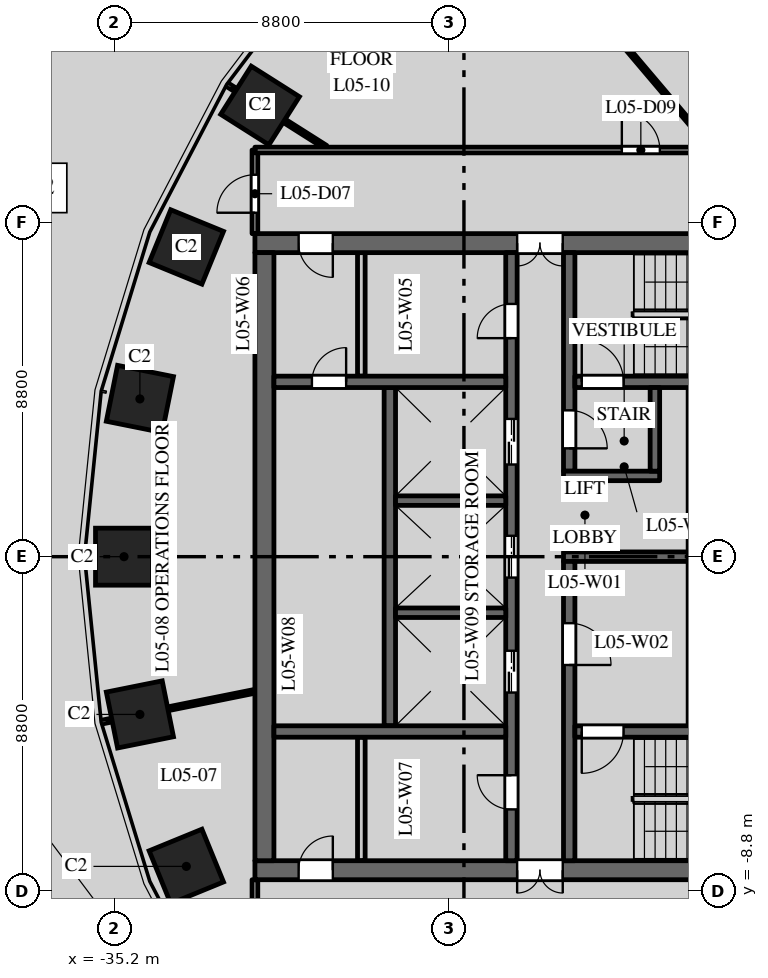
"""IFC4 building model, lengths in metres.
Left out: names, types, materials, properties, quantities, classifications, styles, units other than length and angle.
Written with IfcOpenShell. Run it as: python <this file> out.ifc"""

import sys

from ifc_helpers import new_model, si_unit, direction, frame, frame_2d, origin, origin_2d, place, context, subcontext, project, spatial, rectangle, extrude, element, fill, save


model = new_model("IFC4")
c1 = context("Model", 3, precision=1e-05, world=origin(), true_north=direction((0.0, 1.0)))
c2 = subcontext(c1, "Body", "Model", "MODEL_VIEW")
j1 = project(units=[si_unit("LENGTHUNIT", "METRE"), si_unit("PLANEANGLEUNIT", "RADIAN")], contexts=[c1])
p1 = place(None, origin())
s1 = spatial("IfcSite", under=j1, at=p1, CompositionType="ELEMENT")
p2 = place(p1, origin())
s2 = spatial("IfcBuilding", under=s1, at=p2, CompositionType="ELEMENT")
p3 = place(p2, frame((0.0, 0.0, 30.5)))
s3 = spatial("IfcBuildingStorey", under=s2, at=p3, CompositionType="ELEMENT", Elevation=30.5)
for number, where, z_axis, x_axis in (
    (1, (-31.365, 11.871, 0.0), (0.0, 0.0, 1.0), (-0.535, -0.845, 0.0)),
    (2, (-33.305, 8.149, 0.0), (0.0, 0.0, 1.0), (-0.379, -0.925, 0.0)),
    (3, (-34.527, 4.151, 0.0), (0.0, 0.0, 1.0), (-0.197, -0.98, 0.0)),
    (4, (-34.945, 0.0, 0.0), (0.0, 0.0, 1.0), (0.0, -1.0, 0.0)),
    (5, (-34.527, -4.151, 0.0), (0.0, 0.0, 1.0), (0.197, -0.98, 0.0)),
    (6, (-33.305, -8.149, 0.0), (0.0, 0.0, 1.0), (0.379, -0.925, 0.0)),
):
    element("IfcColumn", number, at=place(p3, frame(where, z_axis=z_axis, x_axis=x_axis)), inside=s3, PredefinedType="COLUMN", context=c2, shape_type="SweptSolid", body=[
        extrude(rectangle(XDim=1.5, YDim=1.5, at=origin_2d()), origin(), (0.0, 0.0, 1.0), 4.0),
    ])
p4 = place(p3, frame((-16.5, 8.25, 0.0), z_axis=(0.0, 0.0, 1.0), x_axis=(-1.0, 0.0, 0.0)))
e7 = element("IfcWall", 7, at=p4, inside=s3, PredefinedType="SHEAR", context=c2, shape_type="SweptSolid", body=[
    extrude(rectangle(XDim=15.0, YDim=0.5, at=frame_2d((7.5, 0.0))), origin(), (0.0, 0.0, 1.0), 3.7),
])
p5 = place(p4, frame((6.9, 0.0, 0.0)))
e8 = element("IfcOpeningElement", 8, at=p5, cuts=e7, PredefinedType="OPENING", context=c2, shape_type="SweptSolid", body=[
    extrude(rectangle(XDim=1.2, YDim=2.1, at=frame_2d((0.6, 1.05))), frame((0.0, 0.26, 0.0), z_axis=(0.0, -1.0, 0.0), x_axis=(1.0, 0.0, 0.0)), (0.0, 0.0, 1.0), 0.52),
])
p6 = place(p4, frame((12.95, 0.0, 0.0)))
e9 = element("IfcOpeningElement", 9, at=p6, cuts=e7, PredefinedType="OPENING", context=c2, shape_type="SweptSolid", body=[
    extrude(rectangle(XDim=0.9, YDim=2.1, at=frame_2d((0.45, 1.05))), frame((0.0, 0.26, 0.0), z_axis=(0.0, -1.0, 0.0), x_axis=(1.0, 0.0, 0.0)), (0.0, 0.0, 1.0), 0.52),
])
p7 = place(p3, frame((-16.5, -8.25, 0.0), z_axis=(0.0, 0.0, 1.0), x_axis=(-1.0, 0.0, 0.0)))
e10 = element("IfcWall", 10, at=p7, inside=s3, PredefinedType="SHEAR", context=c2, shape_type="SweptSolid", body=[
    extrude(rectangle(XDim=15.0, YDim=0.5, at=frame_2d((7.5, 0.0))), origin(), (0.0, 0.0, 1.0), 3.7),
])
p8 = place(p7, frame((6.9, 0.0, 0.0)))
e11 = element("IfcOpeningElement", 11, at=p8, cuts=e10, PredefinedType="OPENING", context=c2, shape_type="SweptSolid", body=[
    extrude(rectangle(XDim=1.2, YDim=2.1, at=frame_2d((0.6, 1.05))), frame((0.0, 0.26, 0.0), z_axis=(0.0, -1.0, 0.0), x_axis=(1.0, 0.0, 0.0)), (0.0, 0.0, 1.0), 0.52),
])
p9 = place(p7, frame((12.95, 0.0, 0.0)))
e12 = element("IfcOpeningElement", 12, at=p9, cuts=e10, PredefinedType="OPENING", context=c2, shape_type="SweptSolid", body=[
    extrude(rectangle(XDim=0.9, YDim=2.1, at=frame_2d((0.45, 1.05))), frame((0.0, 0.26, 0.0), z_axis=(0.0, -1.0, 0.0), x_axis=(1.0, 0.0, 0.0)), (0.0, 0.0, 1.0), 0.52),
])
p10 = place(p3, frame((-27.95, -4.45, 0.0), z_axis=(0.0, 0.0, 1.0), x_axis=(0.0, 1.0, 0.0)))
e13 = element("IfcWall", 13, at=p10, inside=s3, PredefinedType="SHEAR", context=c2, shape_type="SweptSolid", body=[
    extrude(rectangle(XDim=8.9, YDim=0.3, at=frame_2d((4.45, 0.0))), origin(), (0.0, 0.0, 1.0), 3.7),
])
p11 = place(p3, frame((-24.75, -8.0, 0.0), z_axis=(0.0, 0.0, 1.0), x_axis=(0.0, 1.0, 0.0)))
e14 = element("IfcWall", 14, at=p11, inside=s3, PredefinedType="SHEAR", context=c2, shape_type="SweptSolid", body=[
    extrude(rectangle(XDim=16.0, YDim=0.3, at=frame_2d((8.0, 0.0))), origin(), (0.0, 0.0, 1.0), 3.7),
])
p12 = place(p11, frame((4.425, 0.0, 0.0)))
e15 = element("IfcOpeningElement", 15, at=p12, cuts=e14, PredefinedType="OPENING", context=c2, shape_type="SweptSolid", body=[
    extrude(rectangle(XDim=1.1, YDim=2.1, at=frame_2d((0.55, 1.05))), frame((0.0, 0.16, 0.0), z_axis=(0.0, -1.0, 0.0), x_axis=(1.0, 0.0, 0.0)), (0.0, 0.0, 1.0), 0.32),
])
p13 = place(p11, frame((7.45, 0.0, 0.0)))
e16 = element("IfcOpeningElement", 16, at=p13, cuts=e14, PredefinedType="OPENING", context=c2, shape_type="SweptSolid", body=[
    extrude(rectangle(XDim=1.1, YDim=2.1, at=frame_2d((0.55, 1.05))), frame((0.0, 0.16, 0.0), z_axis=(0.0, -1.0, 0.0), x_axis=(1.0, 0.0, 0.0)), (0.0, 0.0, 1.0), 0.32),
])
p14 = place(p11, frame((10.425, 0.0, 0.0)))
e17 = element("IfcOpeningElement", 17, at=p14, cuts=e14, PredefinedType="OPENING", context=c2, shape_type="SweptSolid", body=[
    extrude(rectangle(XDim=1.2, YDim=2.1, at=frame_2d((0.6, 1.05))), frame((0.0, 0.16, 0.0), z_axis=(0.0, -1.0, 0.0), x_axis=(1.0, 0.0, 0.0)), (0.0, 0.0, 1.0), 0.32),
])
p15 = place(p11, frame((13.75, 0.0, 0.0)))
e18 = element("IfcOpeningElement", 18, at=p15, cuts=e14, PredefinedType="OPENING", context=c2, shape_type="SweptSolid", body=[
    extrude(rectangle(XDim=0.9, YDim=2.1, at=frame_2d((0.45, 1.05))), frame((0.0, 0.16, 0.0), z_axis=(0.0, -1.0, 0.0), x_axis=(1.0, 0.0, 0.0)), (0.0, 0.0, 1.0), 0.32),
])
p16 = place(p11, frame((1.35, 0.0, 0.0)))
e19 = element("IfcOpeningElement", 19, at=p16, cuts=e14, PredefinedType="OPENING", context=c2, shape_type="SweptSolid", body=[
    extrude(rectangle(XDim=0.9, YDim=2.1, at=frame_2d((0.45, 1.05))), frame((0.0, 0.16, 0.0), z_axis=(0.0, -1.0, 0.0), x_axis=(1.0, 0.0, 0.0)), (0.0, 0.0, 1.0), 0.32),
])
p17 = place(p3, frame((-20.1, 0.0, 0.0), z_axis=(0.0, 0.0, 1.0), x_axis=(-1.0, 0.0, 0.0)))
e20 = element("IfcWall", 20, at=p17, inside=s3, PredefinedType="SHEAR", context=c2, shape_type="SweptSolid", body=[
    extrude(rectangle(XDim=3.28, YDim=0.25, at=frame_2d((1.64, 0.0))), origin(), (0.0, 0.0, 1.0), 3.7),
])
p18 = place(p3, frame((-31.25, -8.0, 0.0), z_axis=(0.0, 0.0, 1.0), x_axis=(0.0, 1.0, 0.0)))
e21 = element("IfcWall", 21, at=p18, inside=s3, PredefinedType="SHEAR", context=c2, shape_type="SweptSolid", body=[
    extrude(rectangle(XDim=16.0, YDim=0.5, at=frame_2d((8.0, 0.0))), origin(), (0.0, 0.0, 1.0), 3.7),
])
p19 = place(p3, frame((-24.9, 4.6, 0.0), z_axis=(0.0, 0.0, 1.0), x_axis=(-1.0, 0.0, 0.0)))
e22 = element("IfcWall", 22, at=p19, inside=s3, PredefinedType="SHEAR", context=c2, shape_type="SweptSolid", body=[
    extrude(rectangle(XDim=6.1, YDim=0.3, at=frame_2d((3.05, 0.0))), origin(), (0.0, 0.0, 1.0), 3.7),
])
p20 = place(p19, frame((4.2, 0.0, 0.0)))
e23 = element("IfcOpeningElement", 23, at=p20, cuts=e22, PredefinedType="OPENING", context=c2, shape_type="SweptSolid", body=[
    extrude(rectangle(XDim=0.9, YDim=2.1, at=frame_2d((0.45, 1.05))), frame((0.0, 0.16, 0.0), z_axis=(0.0, -1.0, 0.0), x_axis=(1.0, 0.0, 0.0)), (0.0, 0.0, 1.0), 0.32),
])
for number, where, z_axis, x_axis in (
    (24, (-28.7, 4.75, 0.0), (0.0, 0.0, 1.0), (0.0, 1.0, 0.0)),
    (25, (-28.7, -8.0, 0.0), (0.0, 0.0, 1.0), (0.0, 1.0, 0.0)),
):
    element("IfcWall", number, at=place(p3, frame(where, z_axis=z_axis, x_axis=x_axis)), inside=s3, PredefinedType="PARTITIONING", context=c2, shape_type="SweptSolid", body=[
        extrude(rectangle(XDim=3.25, YDim=0.2, at=frame_2d((1.625, 0.0))), origin(), (0.0, 0.0, 1.0), 3.7),
    ])
p21 = place(p3, frame((-24.9, -4.6, 0.0), z_axis=(0.0, 0.0, 1.0), x_axis=(-1.0, 0.0, 0.0)))
e26 = element("IfcWall", 26, at=p21, inside=s3, PredefinedType="SHEAR", context=c2, shape_type="SweptSolid", body=[
    extrude(rectangle(XDim=6.1, YDim=0.3, at=frame_2d((3.05, 0.0))), origin(), (0.0, 0.0, 1.0), 3.7),
])
for number, where, z_axis, x_axis in (
    (27, (-24.9, -1.475, 0.0), (0.0, 0.0, 1.0), (-1.0, 0.0, 0.0)),
    (28, (-24.9, 1.475, 0.0), (0.0, 0.0, 1.0), (-1.0, 0.0, 0.0)),
):
    element("IfcWall", number, at=place(p3, frame(where, z_axis=z_axis, x_axis=x_axis)), inside=s3, PredefinedType="SHEAR", context=c2, shape_type="SweptSolid", body=[
        extrude(rectangle(XDim=2.9, YDim=0.25, at=frame_2d((1.45, 0.0))), origin(), (0.0, 0.0, 1.0), 3.7),
    ])
p22 = place(p3, frame((-23.23, 2.25, 0.0), z_axis=(0.0, 0.0, 1.0), x_axis=(0.0, 1.0, 0.0)))
e29 = element("IfcWall", 29, at=p22, inside=s3, PredefinedType="SHEAR", context=c2, shape_type="SweptSolid", body=[
    extrude(rectangle(XDim=5.75, YDim=0.3, at=frame_2d((2.875, 0.0))), origin(), (0.0, 0.0, 1.0), 3.7),
])
p23 = place(p22, frame((0.6, 0.0, 0.0)))
e30 = element("IfcOpeningElement", 30, at=p23, cuts=e29, PredefinedType="OPENING", context=c2, shape_type="SweptSolid", body=[
    extrude(rectangle(XDim=1.0, YDim=2.1, at=frame_2d((0.5, 1.05))), frame((0.0, 0.16, 0.0), z_axis=(0.0, -1.0, 0.0), x_axis=(1.0, 0.0, 0.0)), (0.0, 0.0, 1.0), 0.32),
])
p24 = place(p3, frame((-23.23, -8.0, 0.0), z_axis=(0.0, 0.0, 1.0), x_axis=(0.0, 1.0, 0.0)))
e31 = element("IfcWall", 31, at=p24, inside=s3, PredefinedType="SHEAR", context=c2, shape_type="SweptSolid", body=[
    extrude(rectangle(XDim=7.875, YDim=0.3, at=frame_2d((3.938, 0.0))), origin(), (0.0, 0.0, 1.0), 3.7),
])
p25 = place(p24, frame((5.15, 0.0, 0.0)))
e32 = element("IfcOpeningElement", 32, at=p25, cuts=e31, PredefinedType="OPENING", context=c2, shape_type="SweptSolid", body=[
    extrude(rectangle(XDim=1.1, YDim=2.1, at=frame_2d((0.55, 1.05))), frame((0.0, 0.16, 0.0), z_axis=(0.0, -1.0, 0.0), x_axis=(1.0, 0.0, 0.0)), (0.0, 0.0, 1.0), 0.32),
])
p26 = place(p3, frame((-16.9, 4.6, 0.0), z_axis=(0.0, 0.0, 1.0), x_axis=(-1.0, 0.0, 0.0)))
e33 = element("IfcWall", 33, at=p26, inside=s3, PredefinedType="SHEAR", context=c2, shape_type="SweptSolid", body=[
    extrude(rectangle(XDim=6.18, YDim=0.3, at=frame_2d((3.09, 0.0))), origin(), (0.0, 0.0, 1.0), 3.7),
])
p27 = place(p26, frame((4.9, 0.0, 0.0)))
e34 = element("IfcOpeningElement", 34, at=p27, cuts=e33, PredefinedType="OPENING", context=c2, shape_type="SweptSolid", body=[
    extrude(rectangle(XDim=1.1, YDim=2.1, at=frame_2d((0.55, 1.05))), frame((0.0, 0.16, 0.0), z_axis=(0.0, -1.0, 0.0), x_axis=(1.0, 0.0, 0.0)), (0.0, 0.0, 1.0), 0.32),
])
p28 = place(p3, frame((-16.9, -4.6, 0.0), z_axis=(0.0, 0.0, 1.0), x_axis=(-1.0, 0.0, 0.0)))
e35 = element("IfcWall", 35, at=p28, inside=s3, PredefinedType="SHEAR", context=c2, shape_type="SweptSolid", body=[
    extrude(rectangle(XDim=6.18, YDim=0.3, at=frame_2d((3.09, 0.0))), origin(), (0.0, 0.0, 1.0), 3.7),
])
p29 = place(p28, frame((4.9, 0.0, 0.0)))
e36 = element("IfcOpeningElement", 36, at=p29, cuts=e35, PredefinedType="OPENING", context=c2, shape_type="SweptSolid", body=[
    extrude(rectangle(XDim=1.1, YDim=2.1, at=frame_2d((0.55, 1.05))), frame((0.0, 0.16, 0.0), z_axis=(0.0, -1.0, 0.0), x_axis=(1.0, 0.0, 0.0)), (0.0, 0.0, 1.0), 0.32),
])
p30 = place(p3, frame((-20.85, 2.125, 0.0), z_axis=(0.0, 0.0, 1.0), x_axis=(-1.0, 0.0, 0.0)))
e37 = element("IfcWall", 37, at=p30, inside=s3, PredefinedType="SHEAR", context=c2, shape_type="SweptSolid", body=[
    extrude(rectangle(XDim=2.53, YDim=0.25, at=frame_2d((1.265, 0.0))), origin(), (0.0, 0.0, 1.0), 3.7),
])
p31 = place(p3, frame((-20.975, 2.25, 0.0), z_axis=(0.0, 0.0, 1.0), x_axis=(0.0, 1.0, 0.0)))
e38 = element("IfcWall", 38, at=p31, inside=s3, PredefinedType="SHEAR", context=c2, shape_type="SweptSolid", body=[
    extrude(rectangle(XDim=2.2, YDim=0.25, at=frame_2d((1.1, 0.0))), origin(), (0.0, 0.0, 1.0), 3.7),
])
p32 = place(p3, frame((-35.512, -4.349, 0.0), z_axis=(0.0, 0.0, 1.0), x_axis=(0.980357474535, 0.197228857227, 0.0)))
e39 = element("IfcWall", 39, at=p32, inside=s3, PredefinedType="PARTITIONING", context=c2, shape_type="SweptSolid", body=[
    extrude(rectangle(XDim=4.092, YDim=0.1, at=frame_2d((2.046, 0.0))), origin(), (0.0, 0.0, 1.0), 3.2),
])
p33 = place(p3, frame((-32.212, 12.408, 0.0), z_axis=(0.0, 0.0, 1.0), x_axis=(0.844810627195, -0.535065420467, 0.0)))
e40 = element("IfcWall", 40, at=p33, inside=s3, PredefinedType="PARTITIONING", context=c2, shape_type="SweptSolid", body=[
    extrude(rectangle(XDim=3.048, YDim=0.1, at=frame_2d((1.524, 0.0))), origin(), (0.0, 0.0, 1.0), 3.7),
])
p34 = place(p3, frame((-31.5, -10.7, 0.0), z_axis=(0.0, 0.0, 1.0), x_axis=(0.0, 1.0, 0.0)))
e41 = element("IfcWall", 41, at=p34, inside=s3, PredefinedType="PARTITIONING", context=c2, shape_type="SweptSolid", body=[
    extrude(rectangle(XDim=2.2, YDim=0.15, at=frame_2d((1.1, 0.0))), origin(), (0.0, 0.0, 1.0), 3.7),
])
p35 = place(p34, frame((0.55, 0.0, 0.0)))
e42 = element("IfcOpeningElement", 42, at=p35, cuts=e41, PredefinedType="OPENING", context=c2, shape_type="SweptSolid", body=[
    extrude(rectangle(XDim=1.0, YDim=2.1, at=frame_2d((0.5, 1.05))), frame((0.0, 0.085, 0.0), z_axis=(0.0, -1.0, 0.0), x_axis=(1.0, 0.0, 0.0)), (0.0, 0.0, 1.0), 0.17),
])
p36 = place(p3, frame((-31.5, 8.5, 0.0), z_axis=(0.0, 0.0, 1.0), x_axis=(0.0, 1.0, 0.0)))
e43 = element("IfcWall", 43, at=p36, inside=s3, PredefinedType="PARTITIONING", context=c2, shape_type="SweptSolid", body=[
    extrude(rectangle(XDim=2.2, YDim=0.15, at=frame_2d((1.1, 0.0))), origin(), (0.0, 0.0, 1.0), 3.7),
])
p37 = place(p36, frame((0.55, 0.0, 0.0)))
e44 = element("IfcOpeningElement", 44, at=p37, cuts=e43, PredefinedType="OPENING", context=c2, shape_type="SweptSolid", body=[
    extrude(rectangle(XDim=1.0, YDim=2.1, at=frame_2d((0.5, 1.05))), frame((0.0, 0.085, 0.0), z_axis=(0.0, -1.0, 0.0), x_axis=(1.0, 0.0, 0.0)), (0.0, 0.0, 1.0), 0.17),
])
p38 = place(p3, frame((-31.5, 10.7, 0.0), z_axis=(0.0, 0.0, 1.0), x_axis=(1.0, 0.0, 0.0)))
e45 = element("IfcWall", 45, at=p38, inside=s3, PredefinedType="PARTITIONING", context=c2, shape_type="SweptSolid", body=[
    extrude(rectangle(XDim=15.0, YDim=0.15, at=frame_2d((7.5, 0.0))), origin(), (0.0, 0.0, 1.0), 3.1),
])
p39 = place(p38, frame((9.655, 0.0, 0.0)))
e46 = element("IfcOpeningElement", 46, at=p39, cuts=e45, PredefinedType="OPENING", context=c2, shape_type="SweptSolid", body=[
    extrude(rectangle(XDim=1.0, YDim=2.1, at=frame_2d((0.5, 1.05))), frame((0.0, 0.085, 0.0), z_axis=(0.0, -1.0, 0.0), x_axis=(1.0, 0.0, 0.0)), (0.0, 0.0, 1.0), 0.17),
])
p40 = place(p38, frame((13.35, 0.0, 0.0)))
e47 = element("IfcOpeningElement", 47, at=p40, cuts=e45, PredefinedType="OPENING", context=c2, shape_type="SweptSolid", body=[
    extrude(rectangle(XDim=1.0, YDim=2.1, at=frame_2d((0.5, 1.05))), frame((0.0, 0.085, 0.0), z_axis=(0.0, -1.0, 0.0), x_axis=(1.0, 0.0, 0.0)), (0.0, 0.0, 1.0), 0.17),
])
p41 = place(p3, frame((-26.43, 18.945, 0.0), z_axis=(0.0, 0.0, 1.0), x_axis=(0.646400187952, -0.762998556365, 0.0)))
e48 = element("IfcWall", 48, at=p41, inside=s3, PredefinedType="PARTITIONING", context=c2, shape_type="SweptSolid", body=[
    extrude(rectangle(XDim=10.704, YDim=0.1, at=frame_2d((5.352, 0.0))), origin(), (0.0, 0.0, 1.0), 3.7),
])
p42 = place(p12, origin())
e49 = element("IfcDoor", 49, at=p42, inside=s3, OperationType="DOUBLE_DOOR_SLIDING", PredefinedType="DOOR", context=c2, shape_type="SweptSolid", body=[
    extrude(rectangle(XDim=1.1, YDim=2.1, at=frame_2d((0.55, 1.05))), frame((0.0, 0.025, 0.0), z_axis=(0.0, -1.0, 0.0), x_axis=(1.0, 0.0, 0.0)), (0.0, 0.0, 1.0), 0.05),
])
fill(e15, e49)
p43 = place(p13, origin())
e50 = element("IfcDoor", 50, at=p43, inside=s3, OperationType="DOUBLE_DOOR_SLIDING", PredefinedType="DOOR", context=c2, shape_type="SweptSolid", body=[
    extrude(rectangle(XDim=1.1, YDim=2.1, at=frame_2d((0.55, 1.05))), frame((0.0, 0.025, 0.0), z_axis=(0.0, -1.0, 0.0), x_axis=(1.0, 0.0, 0.0)), (0.0, 0.0, 1.0), 0.05),
])
fill(e16, e50)
p44 = place(p14, origin())
e51 = element("IfcDoor", 51, at=p44, inside=s3, OperationType="DOUBLE_DOOR_SLIDING", PredefinedType="DOOR", context=c2, shape_type="SweptSolid", body=[
    extrude(rectangle(XDim=1.2, YDim=2.1, at=frame_2d((0.6, 1.05))), frame((0.0, 0.025, 0.0), z_axis=(0.0, -1.0, 0.0), x_axis=(1.0, 0.0, 0.0)), (0.0, 0.0, 1.0), 0.05),
])
fill(e17, e51)
p45 = place(p27, origin())
e52 = element("IfcDoor", 52, at=p45, inside=s3, OperationType="SINGLE_SWING_RIGHT", PredefinedType="DOOR", context=c2, shape_type="SweptSolid", body=[
    extrude(rectangle(XDim=1.1, YDim=2.1, at=frame_2d((0.55, 1.05))), frame((0.0, 0.025, 0.0), z_axis=(0.0, -1.0, 0.0), x_axis=(1.0, 0.0, 0.0)), (0.0, 0.0, 1.0), 0.05),
])
fill(e34, e52)
p46 = place(p29, origin())
e53 = element("IfcDoor", 53, at=p46, inside=s3, OperationType="SINGLE_SWING_LEFT", PredefinedType="DOOR", context=c2, shape_type="SweptSolid", body=[
    extrude(rectangle(XDim=1.1, YDim=2.1, at=frame_2d((0.55, 1.05))), frame((0.0, 0.025, 0.0), z_axis=(0.0, -1.0, 0.0), x_axis=(1.0, 0.0, 0.0)), (0.0, 0.0, 1.0), 0.05),
])
fill(e36, e53)
p47 = place(p25, origin())
e54 = element("IfcDoor", 54, at=p47, inside=s3, OperationType="SINGLE_SWING_LEFT", PredefinedType="DOOR", context=c2, shape_type="SweptSolid", body=[
    extrude(rectangle(XDim=1.1, YDim=2.1, at=frame_2d((0.55, 1.05))), frame((0.0, 0.025, 0.0), z_axis=(0.0, -1.0, 0.0), x_axis=(1.0, 0.0, 0.0)), (0.0, 0.0, 1.0), 0.05),
])
fill(e32, e54)
p48 = place(p23, origin())
e55 = element("IfcDoor", 55, at=p48, inside=s3, OperationType="SINGLE_SWING_LEFT", PredefinedType="DOOR", context=c2, shape_type="SweptSolid", body=[
    extrude(rectangle(XDim=1.0, YDim=2.1, at=frame_2d((0.5, 1.05))), frame((0.0, 0.025, 0.0), z_axis=(0.0, -1.0, 0.0), x_axis=(1.0, 0.0, 0.0)), (0.0, 0.0, 1.0), 0.05),
])
fill(e30, e55)
p49 = place(p5, origin())
e56 = element("IfcDoor", 56, at=p49, inside=s3, OperationType="DOUBLE_DOOR_DOUBLE_SWING", PredefinedType="DOOR", context=c2, shape_type="SweptSolid", body=[
    extrude(rectangle(XDim=1.2, YDim=2.1, at=frame_2d((0.6, 1.05))), frame((0.0, 0.025, 0.0), z_axis=(0.0, -1.0, 0.0), x_axis=(1.0, 0.0, 0.0)), (0.0, 0.0, 1.0), 0.05),
])
fill(e8, e56)
p50 = place(p8, origin())
e57 = element("IfcDoor", 57, at=p50, inside=s3, OperationType="DOUBLE_DOOR_DOUBLE_SWING", PredefinedType="DOOR", context=c2, shape_type="SweptSolid", body=[
    extrude(rectangle(XDim=1.2, YDim=2.1, at=frame_2d((0.6, 1.05))), frame((0.0, 0.025, 0.0), z_axis=(0.0, -1.0, 0.0), x_axis=(1.0, 0.0, 0.0)), (0.0, 0.0, 1.0), 0.05),
])
fill(e11, e57)
p51 = place(p15, origin())
e58 = element("IfcDoor", 58, at=p51, inside=s3, OperationType="SINGLE_SWING_RIGHT", PredefinedType="DOOR", context=c2, shape_type="SweptSolid", body=[
    extrude(rectangle(XDim=0.9, YDim=2.1, at=frame_2d((0.45, 1.05))), frame((0.0, 0.025, 0.0), z_axis=(0.0, -1.0, 0.0), x_axis=(1.0, 0.0, 0.0)), (0.0, 0.0, 1.0), 0.05),
])
fill(e18, e58)
p52 = place(p6, origin())
e59 = element("IfcDoor", 59, at=p52, inside=s3, OperationType="SINGLE_SWING_RIGHT", PredefinedType="DOOR", context=c2, shape_type="SweptSolid", body=[
    extrude(rectangle(XDim=0.9, YDim=2.1, at=frame_2d((0.45, 1.05))), frame((0.0, 0.025, 0.0), z_axis=(0.0, -1.0, 0.0), x_axis=(1.0, 0.0, 0.0)), (0.0, 0.0, 1.0), 0.05),
])
fill(e9, e59)
p53 = place(p16, origin())
e60 = element("IfcDoor", 60, at=p53, inside=s3, OperationType="SINGLE_SWING_LEFT", PredefinedType="DOOR", context=c2, shape_type="SweptSolid", body=[
    extrude(rectangle(XDim=0.9, YDim=2.1, at=frame_2d((0.45, 1.05))), frame((0.0, 0.025, 0.0), z_axis=(0.0, -1.0, 0.0), x_axis=(1.0, 0.0, 0.0)), (0.0, 0.0, 1.0), 0.05),
])
fill(e19, e60)
p54 = place(p9, origin())
e61 = element("IfcDoor", 61, at=p54, inside=s3, OperationType="SINGLE_SWING_LEFT", PredefinedType="DOOR", context=c2, shape_type="SweptSolid", body=[
    extrude(rectangle(XDim=0.9, YDim=2.1, at=frame_2d((0.45, 1.05))), frame((0.0, 0.025, 0.0), z_axis=(0.0, -1.0, 0.0), x_axis=(1.0, 0.0, 0.0)), (0.0, 0.0, 1.0), 0.05),
])
fill(e12, e61)
p55 = place(p20, origin())
e62 = element("IfcDoor", 62, at=p55, inside=s3, OperationType="SINGLE_SWING_LEFT", PredefinedType="DOOR", context=c2, shape_type="SweptSolid", body=[
    extrude(rectangle(XDim=0.9, YDim=2.1, at=frame_2d((0.45, 1.05))), frame((0.0, 0.025, 0.0), z_axis=(0.0, -1.0, 0.0), x_axis=(1.0, 0.0, 0.0)), (0.0, 0.0, 1.0), 0.05),
])
fill(e23, e62)
p56 = place(p37, origin())
e63 = element("IfcDoor", 63, at=p56, inside=s3, OperationType="SINGLE_SWING_LEFT", PredefinedType="DOOR", context=c2, shape_type="SweptSolid", body=[
    extrude(rectangle(XDim=1.0, YDim=2.1, at=frame_2d((0.5, 1.05))), frame((0.0, 0.025, 0.0), z_axis=(0.0, -1.0, 0.0), x_axis=(1.0, 0.0, 0.0)), (0.0, 0.0, 1.0), 0.05),
])
fill(e44, e63)
p57 = place(p39, origin())
e64 = element("IfcDoor", 64, at=p57, inside=s3, OperationType="SINGLE_SWING_LEFT", PredefinedType="DOOR", context=c2, shape_type="SweptSolid", body=[
    extrude(rectangle(XDim=1.0, YDim=2.1, at=frame_2d((0.5, 1.05))), frame((0.0, 0.025, 0.0), z_axis=(0.0, -1.0, 0.0), x_axis=(1.0, 0.0, 0.0)), (0.0, 0.0, 1.0), 0.05),
])
fill(e46, e64)
save(model, sys.argv[1])
